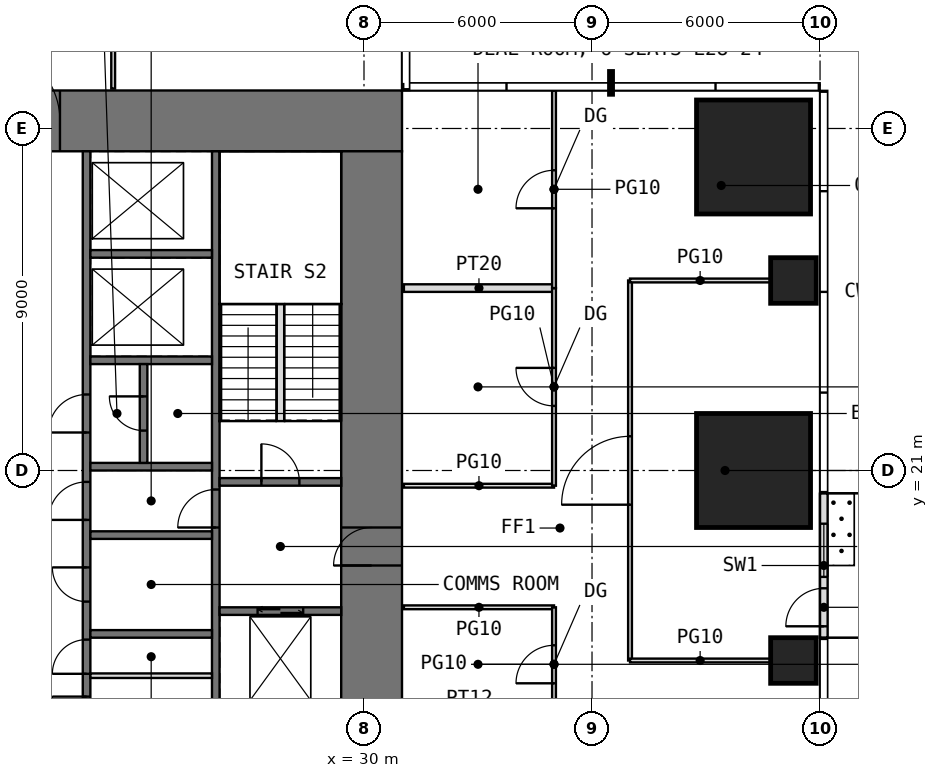
"""IFC4 building model, lengths in metres.
Left out: names, types, materials, properties, quantities, classifications, styles, units other than length and angle.
Written with IfcOpenShell. Run it as: python <this file> out.ifc"""

import sys

from ifc_helpers import new_model, si_unit, direction, frame, frame_2d, origin, origin_2d, place, context, subcontext, project, spatial, rectangle, extrude, element, fill, save


model = new_model("IFC4")
c1 = context("Model", 3, precision=1e-05, world=origin(), true_north=direction((0.0, 1.0)))
c2 = subcontext(c1, "Body", "Model", "MODEL_VIEW")
j1 = project(units=[si_unit("LENGTHUNIT", "METRE"), si_unit("PLANEANGLEUNIT", "RADIAN")], contexts=[c1])
p1 = place(None, origin())
s1 = spatial("IfcSite", under=j1, at=p1, CompositionType="ELEMENT")
p2 = place(p1, origin())
s2 = spatial("IfcBuilding", under=s1, at=p2, CompositionType="ELEMENT")
p3 = place(p2, frame((0.0, 0.0, 120.5)))
s3 = spatial("IfcBuildingStorey", under=s2, at=p3, CompositionType="ELEMENT", Elevation=120.5)
p4 = place(p3, frame((41.3, 16.0, 0.0), z_axis=(0.0, 0.0, 1.0), x_axis=(1.0, 0.0, 0.0)))
e1 = element("IfcColumn", 1, at=p4, inside=s3, PredefinedType="COLUMN", context=c2, shape_type="SweptSolid", body=[
    extrude(rectangle(XDim=1.2, YDim=1.2, at=origin_2d()), origin(), (0.0, 0.0, 1.0), 4.0),
])
p5 = place(p3, frame((40.25, 21.0, 0.0), z_axis=(0.0, 0.0, 1.0), x_axis=(1.0, 0.0, 0.0)))
e2 = element("IfcColumn", 2, at=p5, inside=s3, PredefinedType="COLUMN", context=c2, shape_type="SweptSolid", body=[
    extrude(rectangle(XDim=3.0, YDim=3.0, at=origin_2d()), origin(), (0.0, 0.0, 1.0), 4.0),
])
p6 = place(p3, frame((41.3, 26.0, 0.0), z_axis=(0.0, 0.0, 1.0), x_axis=(1.0, 0.0, 0.0)))
e3 = element("IfcColumn", 3, at=p6, inside=s3, PredefinedType="COLUMN", context=c2, shape_type="SweptSolid", body=[
    extrude(rectangle(XDim=1.2, YDim=1.2, at=origin_2d()), origin(), (0.0, 0.0, 1.0), 4.0),
])
p7 = place(p3, frame((40.25, 29.25, 0.0), z_axis=(0.0, 0.0, 1.0), x_axis=(1.0, 0.0, 0.0)))
e4 = element("IfcColumn", 4, at=p7, inside=s3, PredefinedType="COLUMN", context=c2, shape_type="SweptSolid", body=[
    extrude(rectangle(XDim=3.0, YDim=3.0, at=origin_2d()), origin(), (0.0, 0.0, 1.0), 4.0),
])
p8 = place(p3, frame((42.1, 16.6, 0.0), z_axis=(0.0, 0.0, 1.0), x_axis=(0.0, 1.0, 0.0)))
e5 = element("IfcWall", 5, at=p8, inside=s3, PredefinedType="USERDEFINED", context=c2, shape_type="SweptSolid", body=[
    extrude(rectangle(XDim=3.8, YDim=0.2, at=frame_2d((1.9, 0.0))), origin(), (0.0, 0.0, 1.0), 3.75),
])
p9 = place(p8, frame((0.3, 0.0, 0.0)))
e6 = element("IfcOpeningElement", 6, at=p9, cuts=e5, PredefinedType="OPENING", context=c2, shape_type="SweptSolid", body=[
    extrude(rectangle(XDim=1.0, YDim=2.4, at=frame_2d((0.5, 1.2))), frame((0.0, 0.11, 0.0), z_axis=(0.0, -1.0, 0.0), x_axis=(1.0, 0.0, 0.0)), (0.0, 0.0, 1.0), 0.22),
])
p10 = place(p8, frame((1.6, 0.0, 0.3)))
e7 = element("IfcOpeningElement", 7, at=p10, cuts=e5, PredefinedType="OPENING", context=c2, shape_type="SweptSolid", body=[
    extrude(rectangle(XDim=1.4, YDim=2.7, at=frame_2d((0.7, 1.35))), frame((0.0, 0.11, 0.0), z_axis=(0.0, -1.0, 0.0), x_axis=(1.0, 0.0, 0.0)), (0.0, 0.0, 1.0), 0.22),
])
p11 = place(p3, frame((11.0, 30.2, -0.05), z_axis=(0.0, 0.0, 1.0), x_axis=(1.0, 0.0, 0.0)))
e8 = element("IfcWall", 8, at=p11, inside=s3, PredefinedType="SHEAR", context=c2, shape_type="SweptSolid", body=[
    extrude(rectangle(XDim=20.0, YDim=1.6, at=frame_2d((10.0, 0.0))), origin(), (0.0, 0.0, 1.0), 4.0),
])
p12 = place(p11, frame((9.0, 0.0, 0.05)))
e9 = element("IfcOpeningElement", 9, at=p12, cuts=e8, PredefinedType="OPENING", context=c2, shape_type="SweptSolid", body=[
    extrude(rectangle(XDim=2.0, YDim=2.2, at=frame_2d((1.0, 1.1))), frame((0.0, 0.81, 0.0), z_axis=(0.0, -1.0, 0.0), x_axis=(1.0, 0.0, 0.0)), (0.0, 0.0, 1.0), 1.62),
])
p13 = place(p3, frame((30.2, 12.6, -0.05), z_axis=(0.0, 0.0, 1.0), x_axis=(0.0, 1.0, 0.0)))
e10 = element("IfcWall", 10, at=p13, inside=s3, PredefinedType="SHEAR", context=c2, shape_type="SweptSolid", body=[
    extrude(rectangle(XDim=16.8, YDim=1.6, at=frame_2d((8.4, 0.0))), origin(), (0.0, 0.0, 1.0), 4.0),
])
p14 = place(p13, frame((5.9, 0.0, 0.05)))
e11 = element("IfcOpeningElement", 11, at=p14, cuts=e10, PredefinedType="OPENING", context=c2, shape_type="SweptSolid", body=[
    extrude(rectangle(XDim=1.0, YDim=2.2, at=frame_2d((0.5, 1.1))), frame((0.0, 0.81, 0.0), z_axis=(0.0, -1.0, 0.0), x_axis=(1.0, 0.0, 0.0)), (0.0, 0.0, 1.0), 1.62),
])
p15 = place(p3, frame((22.7, 12.6, -0.05), z_axis=(0.0, 0.0, 1.0), x_axis=(0.0, 1.0, 0.0)))
e12 = element("IfcWall", 12, at=p15, inside=s3, PredefinedType="SHEAR", context=c2, shape_type="SweptSolid", body=[
    extrude(rectangle(XDim=16.8, YDim=0.2, at=frame_2d((8.4, 0.0))), origin(), (0.0, 0.0, 1.0), 4.0),
])
p16 = place(p15, frame((3.05, 0.0, 0.05)))
e13 = element("IfcOpeningElement", 13, at=p16, cuts=e12, PredefinedType="OPENING", context=c2, shape_type="SweptSolid", body=[
    extrude(rectangle(XDim=0.9, YDim=2.2, at=frame_2d((0.45, 1.1))), frame((0.0, 0.11, 0.0), z_axis=(0.0, -1.0, 0.0), x_axis=(1.0, 0.0, 0.0)), (0.0, 0.0, 1.0), 0.22),
])
p17 = place(p15, frame((7.1, 0.0, 0.05)))
e14 = element("IfcOpeningElement", 14, at=p17, cuts=e12, PredefinedType="OPENING", context=c2, shape_type="SweptSolid", body=[
    extrude(rectangle(XDim=1.0, YDim=2.2, at=frame_2d((0.5, 1.1))), frame((0.0, 0.11, 0.0), z_axis=(0.0, -1.0, 0.0), x_axis=(1.0, 0.0, 0.0)), (0.0, 0.0, 1.0), 0.22),
])
p18 = place(p15, frame((1.55, 0.0, 0.05)))
e15 = element("IfcOpeningElement", 15, at=p18, cuts=e12, PredefinedType="OPENING", context=c2, shape_type="SweptSolid", body=[
    extrude(rectangle(XDim=0.9, YDim=2.2, at=frame_2d((0.45, 1.1))), frame((0.0, 0.11, 0.0), z_axis=(0.0, -1.0, 0.0), x_axis=(1.0, 0.0, 0.0)), (0.0, 0.0, 1.0), 0.22),
])
p19 = place(p15, frame((4.95, 0.0, 0.05)))
e16 = element("IfcOpeningElement", 16, at=p19, cuts=e12, PredefinedType="OPENING", context=c2, shape_type="SweptSolid", body=[
    extrude(rectangle(XDim=0.9, YDim=2.2, at=frame_2d((0.45, 1.1))), frame((0.0, 0.11, 0.0), z_axis=(0.0, -1.0, 0.0), x_axis=(1.0, 0.0, 0.0)), (0.0, 0.0, 1.0), 0.22),
])
p20 = place(p15, frame((9.4, 0.0, 0.05)))
e17 = element("IfcOpeningElement", 17, at=p20, cuts=e12, PredefinedType="OPENING", context=c2, shape_type="SweptSolid", body=[
    extrude(rectangle(XDim=1.0, YDim=2.2, at=frame_2d((0.5, 1.1))), frame((0.0, 0.11, 0.0), z_axis=(0.0, -1.0, 0.0), x_axis=(1.0, 0.0, 0.0)), (0.0, 0.0, 1.0), 0.22),
])
p21 = place(p3, frame((26.1, 12.6, -0.05), z_axis=(0.0, 0.0, 1.0), x_axis=(0.0, 1.0, 0.0)))
e18 = element("IfcWall", 18, at=p21, inside=s3, PredefinedType="SHEAR", context=c2, shape_type="SweptSolid", body=[
    extrude(rectangle(XDim=16.8, YDim=0.2, at=frame_2d((8.4, 0.0))), origin(), (0.0, 0.0, 1.0), 4.0),
])
p22 = place(p21, frame((6.9, 0.0, 0.05)))
e19 = element("IfcOpeningElement", 19, at=p22, cuts=e18, PredefinedType="OPENING", context=c2, shape_type="SweptSolid", body=[
    extrude(rectangle(XDim=1.0, YDim=2.2, at=frame_2d((0.5, 1.1))), frame((0.0, 0.11, 0.0), z_axis=(0.0, -1.0, 0.0), x_axis=(1.0, 0.0, 0.0)), (0.0, 0.0, 1.0), 0.22),
])
for number, where, z_axis, x_axis in (
    (20, (22.8, 16.7, -0.05), (0.0, 0.0, 1.0), (1.0, 0.0, 0.0)),
    (21, (22.8, 19.3, -0.05), (0.0, 0.0, 1.0), (1.0, 0.0, 0.0)),
    (22, (22.8, 21.1, -0.05), (0.0, 0.0, 1.0), (1.0, 0.0, 0.0)),
    (23, (22.8, 23.9, -0.05), (0.0, 0.0, 1.0), (1.0, 0.0, 0.0)),
    (24, (22.8, 26.7, -0.05), (0.0, 0.0, 1.0), (1.0, 0.0, 0.0)),
):
    element("IfcWall", number, at=place(p3, frame(where, z_axis=z_axis, x_axis=x_axis)), inside=s3, PredefinedType="SHEAR", context=c2, shape_type="SweptSolid", body=[
        extrude(rectangle(XDim=3.2, YDim=0.2, at=frame_2d((1.6, 0.0))), origin(), (0.0, 0.0, 1.0), 4.0),
    ])
p23 = place(p3, frame((26.2, 17.3, -0.05), z_axis=(0.0, 0.0, 1.0), x_axis=(1.0, 0.0, 0.0)))
e25 = element("IfcWall", 25, at=p23, inside=s3, PredefinedType="SHEAR", context=c2, shape_type="SweptSolid", body=[
    extrude(rectangle(XDim=3.2, YDim=0.2, at=frame_2d((1.6, 0.0))), origin(), (0.0, 0.0, 1.0), 4.0),
])
p24 = place(p23, frame((1.0, 0.0, 0.05)))
e26 = element("IfcOpeningElement", 26, at=p24, cuts=e25, PredefinedType="OPENING", context=c2, shape_type="SweptSolid", body=[
    extrude(rectangle(XDim=1.2, YDim=2.2, at=frame_2d((0.6, 1.1))), frame((0.0, 0.11, 0.0), z_axis=(0.0, -1.0, 0.0), x_axis=(1.0, 0.0, 0.0)), (0.0, 0.0, 1.0), 0.22),
])
p25 = place(p3, frame((26.2, 20.7, -0.05), z_axis=(0.0, 0.0, 1.0), x_axis=(1.0, 0.0, 0.0)))
e27 = element("IfcWall", 27, at=p25, inside=s3, PredefinedType="SHEAR", context=c2, shape_type="SweptSolid", body=[
    extrude(rectangle(XDim=3.2, YDim=0.2, at=frame_2d((1.6, 0.0))), origin(), (0.0, 0.0, 1.0), 4.0),
])
p26 = place(p25, frame((1.1, 0.0, 0.05)))
e28 = element("IfcOpeningElement", 28, at=p26, cuts=e27, PredefinedType="OPENING", context=c2, shape_type="SweptSolid", body=[
    extrude(rectangle(XDim=1.0, YDim=2.2, at=frame_2d((0.5, 1.1))), frame((0.0, 0.11, 0.0), z_axis=(0.0, -1.0, 0.0), x_axis=(1.0, 0.0, 0.0)), (0.0, 0.0, 1.0), 0.22),
])
p27 = place(p3, frame((22.8, 15.6, 0.0), z_axis=(0.0, 0.0, 1.0), x_axis=(1.0, 0.0, 0.0)))
e29 = element("IfcWall", 29, at=p27, inside=s3, PredefinedType="PARTITIONING", context=c2, shape_type="SweptSolid", body=[
    extrude(rectangle(XDim=3.2, YDim=0.12, at=frame_2d((1.6, 0.0))), origin(), (0.0, 0.0, 1.0), 3.75),
])
p28 = place(p3, frame((24.2, 21.2, -0.05), z_axis=(0.0, 0.0, 1.0), x_axis=(0.0, 1.0, 0.0)))
e30 = element("IfcWall", 30, at=p28, inside=s3, PredefinedType="SHEAR", context=c2, shape_type="SweptSolid", body=[
    extrude(rectangle(XDim=2.6, YDim=0.2, at=frame_2d((1.3, 0.0))), origin(), (0.0, 0.0, 1.0), 4.0),
])
p29 = place(p28, frame((0.85, 0.0, 0.05)))
e31 = element("IfcOpeningElement", 31, at=p29, cuts=e30, PredefinedType="OPENING", context=c2, shape_type="SweptSolid", body=[
    extrude(rectangle(XDim=0.9, YDim=2.2, at=frame_2d((0.45, 1.1))), frame((0.0, 0.11, 0.0), z_axis=(0.0, -1.0, 0.0), x_axis=(1.0, 0.0, 0.0)), (0.0, 0.0, 1.0), 0.22),
])
for number, where, z_axis, x_axis in (
    (32, (23.4, 31.05, 0.0), (0.0, 0.0, 1.0), (0.0, 1.0, 0.0)),
    (33, (31.05, 17.4, 0.0), (0.0, 0.0, 1.0), (1.0, 0.0, 0.0)),
    (34, (31.05, 20.6, 0.0), (0.0, 0.0, 1.0), (1.0, 0.0, 0.0)),
):
    element("IfcWall", number, at=place(p3, frame(where, z_axis=z_axis, x_axis=x_axis)), inside=s3, PredefinedType="PARTITIONING", context=c2, shape_type="SweptSolid", body=[
        extrude(rectangle(XDim=3.95, YDim=0.1, at=frame_2d((1.975, 0.0))), origin(), (0.0, 0.0, 1.0), 3.75),
    ])
p30 = place(p3, frame((31.05, 25.8, 0.0), z_axis=(0.0, 0.0, 1.0), x_axis=(1.0, 0.0, 0.0)))
e35 = element("IfcWall", 35, at=p30, inside=s3, PredefinedType="PARTITIONING", context=c2, shape_type="SweptSolid", body=[
    extrude(rectangle(XDim=3.95, YDim=0.2, at=frame_2d((1.975, 0.0))), origin(), (0.0, 0.0, 1.0), 3.75),
])
p31 = place(p3, frame((35.0, 14.4, 0.0), z_axis=(0.0, 0.0, 1.0), x_axis=(0.0, 1.0, 0.0)))
e36 = element("IfcWall", 36, at=p31, inside=s3, PredefinedType="PARTITIONING", context=c2, shape_type="SweptSolid", body=[
    extrude(rectangle(XDim=3.0, YDim=0.1, at=frame_2d((1.5, 0.0))), origin(), (0.0, 0.0, 1.0), 3.75),
])
p32 = place(p31, frame((1.0, 0.0, 0.0)))
e37 = element("IfcOpeningElement", 37, at=p32, cuts=e36, PredefinedType="OPENING", context=c2, shape_type="SweptSolid", body=[
    extrude(rectangle(XDim=1.0, YDim=2.4, at=frame_2d((0.5, 1.2))), frame((0.0, 0.06, 0.0), z_axis=(0.0, -1.0, 0.0), x_axis=(1.0, 0.0, 0.0)), (0.0, 0.0, 1.0), 0.12),
])
p33 = place(p3, frame((35.0, 20.6, 0.0), z_axis=(0.0, 0.0, 1.0), x_axis=(0.0, 1.0, 0.0)))
e38 = element("IfcWall", 38, at=p33, inside=s3, PredefinedType="PARTITIONING", context=c2, shape_type="SweptSolid", body=[
    extrude(rectangle(XDim=5.2, YDim=0.1, at=frame_2d((2.6, 0.0))), origin(), (0.0, 0.0, 1.0), 3.75),
])
p34 = place(p33, frame((2.1, 0.0, 0.0)))
e39 = element("IfcOpeningElement", 39, at=p34, cuts=e38, PredefinedType="OPENING", context=c2, shape_type="SweptSolid", body=[
    extrude(rectangle(XDim=1.0, YDim=2.4, at=frame_2d((0.5, 1.2))), frame((0.0, 0.06, 0.0), z_axis=(0.0, -1.0, 0.0), x_axis=(1.0, 0.0, 0.0)), (0.0, 0.0, 1.0), 0.12),
])
p35 = place(p3, frame((35.0, 25.8, 0.0), z_axis=(0.0, 0.0, 1.0), x_axis=(0.0, 1.0, 0.0)))
e40 = element("IfcWall", 40, at=p35, inside=s3, PredefinedType="PARTITIONING", context=c2, shape_type="SweptSolid", body=[
    extrude(rectangle(XDim=5.2, YDim=0.1, at=frame_2d((2.6, 0.0))), origin(), (0.0, 0.0, 1.0), 3.75),
])
p36 = place(p35, frame((2.1, 0.0, 0.0)))
e41 = element("IfcOpeningElement", 41, at=p36, cuts=e40, PredefinedType="OPENING", context=c2, shape_type="SweptSolid", body=[
    extrude(rectangle(XDim=1.0, YDim=2.4, at=frame_2d((0.5, 1.2))), frame((0.0, 0.06, 0.0), z_axis=(0.0, -1.0, 0.0), x_axis=(1.0, 0.0, 0.0)), (0.0, 0.0, 1.0), 0.12),
])
p37 = place(p3, frame((37.0, 16.0, 0.0), z_axis=(0.0, 0.0, 1.0), x_axis=(0.0, 1.0, 0.0)))
e42 = element("IfcWall", 42, at=p37, inside=s3, PredefinedType="PARTITIONING", context=c2, shape_type="SweptSolid", body=[
    extrude(rectangle(XDim=10.0, YDim=0.1, at=frame_2d((5.0, 0.0))), origin(), (0.0, 0.0, 1.0), 3.75),
])
p38 = place(p37, frame((4.1, 0.0, 0.0)))
e43 = element("IfcOpeningElement", 43, at=p38, cuts=e42, PredefinedType="OPENING", context=c2, shape_type="SweptSolid", body=[
    extrude(rectangle(XDim=1.8, YDim=2.4, at=frame_2d((0.9, 1.2))), frame((0.0, 0.06, 0.0), z_axis=(0.0, -1.0, 0.0), x_axis=(1.0, 0.0, 0.0)), (0.0, 0.0, 1.0), 0.12),
])
for number, where, z_axis, x_axis in (
    (44, (37.0, 16.0, 0.0), (0.0, 0.0, 1.0), (1.0, 0.0, 0.0)),
    (45, (37.0, 26.0, 0.0), (0.0, 0.0, 1.0), (1.0, 0.0, 0.0)),
):
    element("IfcWall", number, at=place(p3, frame(where, z_axis=z_axis, x_axis=x_axis)), inside=s3, PredefinedType="PARTITIONING", context=c2, shape_type="SweptSolid", body=[
        extrude(rectangle(XDim=3.69, YDim=0.1, at=frame_2d((1.845, 0.0))), origin(), (0.0, 0.0, 1.0), 3.75),
    ])
p39 = place(p3, frame((27.8, 22.3, 0.0), z_axis=(0.0, 0.0, 1.0), x_axis=(0.0, 1.0, 0.0)))
e46 = element("IfcWall", 46, at=p39, inside=s3, PredefinedType="PARTITIONING", context=c2, shape_type="SweptSolid", body=[
    extrude(rectangle(XDim=3.08, YDim=0.2, at=frame_2d((1.54, 0.0))), origin(), (0.0, 0.0, 1.0), 4.0),
])
p40 = place(p9, origin())
e47 = element("IfcDoor", 47, at=p40, inside=s3, OperationType="SINGLE_SWING_LEFT", PredefinedType="DOOR", context=c2, shape_type="SweptSolid", body=[
    extrude(rectangle(XDim=1.0, YDim=2.4, at=frame_2d((0.5, 1.2))), frame((0.0, 0.025, 0.0), z_axis=(0.0, -1.0, 0.0), x_axis=(1.0, 0.0, 0.0)), (0.0, 0.0, 1.0), 0.05),
])
fill(e6, e47)
p41 = place(p10, origin())
e48 = element("IfcWindow", 48, at=p41, inside=s3, PartitioningType="SINGLE_PANEL", PredefinedType="WINDOW", context=c2, shape_type="SweptSolid", body=[
    extrude(rectangle(XDim=1.4, YDim=2.7, at=frame_2d((0.7, 1.35))), frame((0.0, 0.03, 0.0), z_axis=(0.0, -1.0, 0.0), x_axis=(1.0, 0.0, 0.0)), (0.0, 0.0, 1.0), 0.06),
])
fill(e7, e48)
p42 = place(p12, origin())
e49 = element("IfcDoor", 49, at=p42, inside=s3, OperationType="DOUBLE_DOOR_SINGLE_SWING", PredefinedType="DOOR", context=c2, shape_type="SweptSolid", body=[
    extrude(rectangle(XDim=2.0, YDim=2.2, at=frame_2d((1.0, 1.1))), frame((0.0, 0.025, 0.0), z_axis=(0.0, -1.0, 0.0), x_axis=(1.0, 0.0, 0.0)), (0.0, 0.0, 1.0), 0.05),
])
fill(e9, e49)
p43 = place(p16, origin())
e50 = element("IfcDoor", 50, at=p43, inside=s3, OperationType="SINGLE_SWING_LEFT", PredefinedType="DOOR", context=c2, shape_type="SweptSolid", body=[
    extrude(rectangle(XDim=0.9, YDim=2.2, at=frame_2d((0.45, 1.1))), frame((0.0, 0.025, 0.0), z_axis=(0.0, -1.0, 0.0), x_axis=(1.0, 0.0, 0.0)), (0.0, 0.0, 1.0), 0.05),
])
fill(e13, e50)
p44 = place(p14, origin())
e51 = element("IfcDoor", 51, at=p44, inside=s3, OperationType="SINGLE_SWING_LEFT", PredefinedType="DOOR", context=c2, shape_type="SweptSolid", body=[
    extrude(rectangle(XDim=1.0, YDim=2.2, at=frame_2d((0.5, 1.1))), frame((0.0, 0.025, 0.0), z_axis=(0.0, -1.0, 0.0), x_axis=(1.0, 0.0, 0.0)), (0.0, 0.0, 1.0), 0.05),
])
fill(e11, e51)
p45 = place(p26, origin())
e52 = element("IfcDoor", 52, at=p45, inside=s3, OperationType="SINGLE_SWING_LEFT", PredefinedType="DOOR", context=c2, shape_type="SweptSolid", body=[
    extrude(rectangle(XDim=1.0, YDim=2.2, at=frame_2d((0.5, 1.1))), frame((0.0, 0.025, 0.0), z_axis=(0.0, -1.0, 0.0), x_axis=(1.0, 0.0, 0.0)), (0.0, 0.0, 1.0), 0.05),
])
fill(e28, e52)
p46 = place(p22, origin())
e53 = element("IfcDoor", 53, at=p46, inside=s3, OperationType="SINGLE_SWING_LEFT", PredefinedType="DOOR", context=c2, shape_type="SweptSolid", body=[
    extrude(rectangle(XDim=1.0, YDim=2.2, at=frame_2d((0.5, 1.1))), frame((0.0, 0.025, 0.0), z_axis=(0.0, -1.0, 0.0), x_axis=(1.0, 0.0, 0.0)), (0.0, 0.0, 1.0), 0.05),
])
fill(e19, e53)
p47 = place(p17, origin())
e54 = element("IfcDoor", 54, at=p47, inside=s3, OperationType="SINGLE_SWING_LEFT", PredefinedType="DOOR", context=c2, shape_type="SweptSolid", body=[
    extrude(rectangle(XDim=1.0, YDim=2.2, at=frame_2d((0.5, 1.1))), frame((0.0, 0.025, 0.0), z_axis=(0.0, -1.0, 0.0), x_axis=(1.0, 0.0, 0.0)), (0.0, 0.0, 1.0), 0.05),
])
fill(e14, e54)
p48 = place(p18, origin())
e55 = element("IfcDoor", 55, at=p48, inside=s3, OperationType="SINGLE_SWING_RIGHT", PredefinedType="DOOR", context=c2, shape_type="SweptSolid", body=[
    extrude(rectangle(XDim=0.9, YDim=2.2, at=frame_2d((0.45, 1.1))), frame((0.0, 0.025, 0.0), z_axis=(0.0, -1.0, 0.0), x_axis=(1.0, 0.0, 0.0)), (0.0, 0.0, 1.0), 0.05),
])
fill(e15, e55)
p49 = place(p19, origin())
e56 = element("IfcDoor", 56, at=p49, inside=s3, OperationType="SINGLE_SWING_RIGHT", PredefinedType="DOOR", context=c2, shape_type="SweptSolid", body=[
    extrude(rectangle(XDim=0.9, YDim=2.2, at=frame_2d((0.45, 1.1))), frame((0.0, 0.025, 0.0), z_axis=(0.0, -1.0, 0.0), x_axis=(1.0, 0.0, 0.0)), (0.0, 0.0, 1.0), 0.05),
])
fill(e16, e56)
p50 = place(p20, origin())
e57 = element("IfcDoor", 57, at=p50, inside=s3, OperationType="SINGLE_SWING_LEFT", PredefinedType="DOOR", context=c2, shape_type="SweptSolid", body=[
    extrude(rectangle(XDim=1.0, YDim=2.2, at=frame_2d((0.5, 1.1))), frame((0.0, 0.025, 0.0), z_axis=(0.0, -1.0, 0.0), x_axis=(1.0, 0.0, 0.0)), (0.0, 0.0, 1.0), 0.05),
])
fill(e17, e57)
p51 = place(p29, origin())
e58 = element("IfcDoor", 58, at=p51, inside=s3, OperationType="SINGLE_SWING_RIGHT", PredefinedType="DOOR", context=c2, shape_type="SweptSolid", body=[
    extrude(rectangle(XDim=0.9, YDim=2.2, at=frame_2d((0.45, 1.1))), frame((0.0, 0.025, 0.0), z_axis=(0.0, -1.0, 0.0), x_axis=(1.0, 0.0, 0.0)), (0.0, 0.0, 1.0), 0.05),
])
fill(e31, e58)
p52 = place(p32, origin())
e59 = element("IfcDoor", 59, at=p52, inside=s3, OperationType="SINGLE_SWING_LEFT", PredefinedType="DOOR", context=c2, shape_type="SweptSolid", body=[
    extrude(rectangle(XDim=1.0, YDim=2.4, at=frame_2d((0.5, 1.2))), frame((0.0, 0.025, 0.0), z_axis=(0.0, -1.0, 0.0), x_axis=(1.0, 0.0, 0.0)), (0.0, 0.0, 1.0), 0.05),
])
fill(e37, e59)
p53 = place(p34, origin())
e60 = element("IfcDoor", 60, at=p53, inside=s3, OperationType="SINGLE_SWING_RIGHT", PredefinedType="DOOR", context=c2, shape_type="SweptSolid", body=[
    extrude(rectangle(XDim=1.0, YDim=2.4, at=frame_2d((0.5, 1.2))), frame((0.0, 0.025, 0.0), z_axis=(0.0, -1.0, 0.0), x_axis=(1.0, 0.0, 0.0)), (0.0, 0.0, 1.0), 0.05),
])
fill(e39, e60)
p54 = place(p36, origin())
e61 = element("IfcDoor", 61, at=p54, inside=s3, OperationType="SINGLE_SWING_LEFT", PredefinedType="DOOR", context=c2, shape_type="SweptSolid", body=[
    extrude(rectangle(XDim=1.0, YDim=2.4, at=frame_2d((0.5, 1.2))), frame((0.0, 0.025, 0.0), z_axis=(0.0, -1.0, 0.0), x_axis=(1.0, 0.0, 0.0)), (0.0, 0.0, 1.0), 0.05),
])
fill(e41, e61)
p55 = place(p38, origin())
e62 = element("IfcDoor", 62, at=p55, inside=s3, OperationType="DOUBLE_DOOR_SINGLE_SWING", PredefinedType="DOOR", context=c2, shape_type="SweptSolid", body=[
    extrude(rectangle(XDim=1.8, YDim=2.4, at=frame_2d((0.9, 1.2))), frame((0.0, 0.025, 0.0), z_axis=(0.0, -1.0, 0.0), x_axis=(1.0, 0.0, 0.0)), (0.0, 0.0, 1.0), 0.05),
])
fill(e43, e62)
p56 = place(p24, origin())
e63 = element("IfcDoor", 63, at=p56, inside=s3, OperationType="DOUBLE_DOOR_SLIDING", PredefinedType="DOOR", context=c2, shape_type="SweptSolid", body=[
    extrude(rectangle(XDim=1.2, YDim=2.2, at=frame_2d((0.6, 1.1))), frame((0.0, 0.025, 0.0), z_axis=(0.0, -1.0, 0.0), x_axis=(1.0, 0.0, 0.0)), (0.0, 0.0, 1.0), 0.05),
])
fill(e26, e63)
save(model, sys.argv[1])
